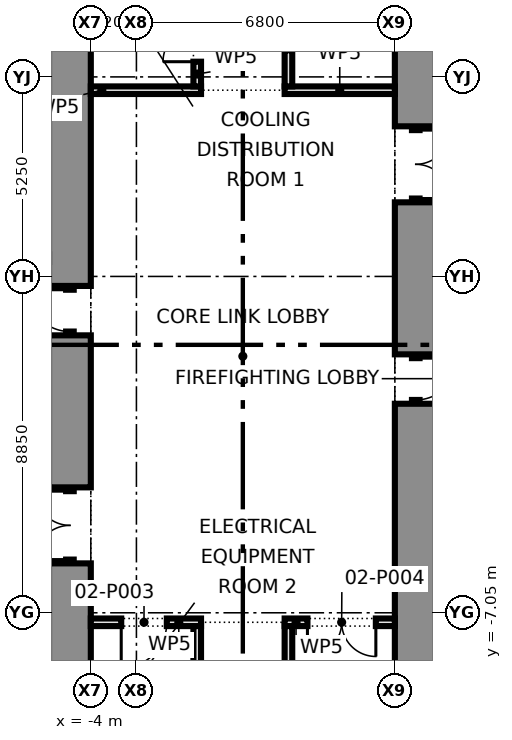
"""IFC4 building model, lengths in metres.
Left out: names, types, materials, properties, quantities, classifications, styles, units other than length and angle.
Written with IfcOpenShell. Run it as: python <this file> out.ifc"""

import sys

from ifc_helpers import new_model, si_unit, direction, frame, frame_2d, origin, place, context, subcontext, project, spatial, rectangle, extrude, element, fill, save


model = new_model("IFC4")
c1 = context("Model", 3, precision=1e-05, world=origin(), true_north=direction((0.0, 1.0)))
c2 = subcontext(c1, "Body", "Model", "MODEL_VIEW")
j1 = project(units=[si_unit("LENGTHUNIT", "METRE"), si_unit("PLANEANGLEUNIT", "RADIAN")], contexts=[c1])
p1 = place(None, origin())
s1 = spatial("IfcSite", under=j1, at=p1, CompositionType="ELEMENT")
p2 = place(p1, origin())
s2 = spatial("IfcBuilding", under=s1, at=p2, CompositionType="ELEMENT")
p3 = place(p2, frame((0.0, 0.0, 6.5)))
s3 = spatial("IfcBuildingStorey", under=s2, at=p3, CompositionType="ELEMENT", Elevation=6.5)
p4 = place(p3, frame((-4.55, -8.9, 0.0), z_axis=(0.0, 0.0, 1.0), x_axis=(0.0, 1.0, 0.0)))
e1 = element("IfcWall", 1, at=p4, inside=s3, PredefinedType="SHEAR", context=c2, shape_type="SweptSolid", body=[
    extrude(rectangle(XDim=3.15, YDim=1.1, at=frame_2d((1.575, 0.0))), origin(), (0.0, 0.0, 1.0), 4.575),
])
p5 = place(p3, frame((-4.55, -5.75, 0.0), z_axis=(0.0, 0.0, 1.0), x_axis=(0.0, 1.0, 0.0)))
e2 = element("IfcWall", 2, at=p5, inside=s3, PredefinedType="PARTITIONING", context=c2, shape_type="SweptSolid", body=[
    extrude(rectangle(XDim=2.0, YDim=0.2, at=frame_2d((1.0, 0.0))), origin(), (0.0, 0.0, 1.0), 2.4),
])
p6 = place(p5, frame((0.1, 0.0, 0.0)))
e3 = element("IfcOpeningElement", 3, at=p6, cuts=e2, PredefinedType="OPENING", context=c2, shape_type="SweptSolid", body=[
    extrude(rectangle(XDim=1.8, YDim=2.1, at=frame_2d((0.9, 1.05))), frame((0.0, 0.11, 0.0), z_axis=(0.0, -1.0, 0.0), x_axis=(1.0, 0.0, 0.0)), (0.0, 0.0, 1.0), 0.22),
])
p7 = place(p3, frame((-4.55, -3.75, 0.0), z_axis=(0.0, 0.0, 1.0), x_axis=(0.0, 1.0, 0.0)))
e4 = element("IfcWall", 4, at=p7, inside=s3, PredefinedType="SHEAR", context=c2, shape_type="SweptSolid", body=[
    extrude(rectangle(XDim=4.0, YDim=1.1, at=frame_2d((2.0, 0.0))), origin(), (0.0, 0.0, 1.0), 4.575),
])
p8 = place(p3, frame((-4.55, 0.25, 0.0), z_axis=(0.0, 0.0, 1.0), x_axis=(0.0, 1.0, 0.0)))
e5 = element("IfcWall", 5, at=p8, inside=s3, PredefinedType="PARTITIONING", context=c2, shape_type="SweptSolid", body=[
    extrude(rectangle(XDim=1.3, YDim=0.2, at=frame_2d((0.65, 0.0))), origin(), (0.0, 0.0, 1.0), 2.4),
])
p9 = place(p8, frame((0.1, 0.0, 0.0)))
e6 = element("IfcOpeningElement", 6, at=p9, cuts=e5, PredefinedType="OPENING", context=c2, shape_type="SweptSolid", body=[
    extrude(rectangle(XDim=1.1, YDim=2.1, at=frame_2d((0.55, 1.05))), frame((0.0, 0.11, 0.0), z_axis=(0.0, -1.0, 0.0), x_axis=(1.0, 0.0, 0.0)), (0.0, 0.0, 1.0), 0.22),
])
p10 = place(p3, frame((-4.55, 1.55, 0.0), z_axis=(0.0, 0.0, 1.0), x_axis=(0.0, 1.0, 0.0)))
e7 = element("IfcWall", 7, at=p10, inside=s3, PredefinedType="SHEAR", context=c2, shape_type="SweptSolid", body=[
    extrude(rectangle(XDim=7.35, YDim=1.1, at=frame_2d((3.675, 0.0))), origin(), (0.0, 0.0, 1.0), 4.575),
])
p11 = place(p3, frame((4.55, 8.9, 0.0), z_axis=(0.0, 0.0, 1.0), x_axis=(0.0, -1.0, 0.0)))
e8 = element("IfcWall", 8, at=p11, inside=s3, PredefinedType="SHEAR", context=c2, shape_type="SweptSolid", body=[
    extrude(rectangle(XDim=3.15, YDim=1.1, at=frame_2d((1.575, 0.0))), origin(), (0.0, 0.0, 1.0), 4.575),
])
p12 = place(p3, frame((4.55, 5.75, 0.0), z_axis=(0.0, 0.0, 1.0), x_axis=(0.0, -1.0, 0.0)))
e9 = element("IfcWall", 9, at=p12, inside=s3, PredefinedType="PARTITIONING", context=c2, shape_type="SweptSolid", body=[
    extrude(rectangle(XDim=2.0, YDim=0.2, at=frame_2d((1.0, 0.0))), origin(), (0.0, 0.0, 1.0), 2.4),
])
p13 = place(p12, frame((0.1, 0.0, 0.0)))
e10 = element("IfcOpeningElement", 10, at=p13, cuts=e9, PredefinedType="OPENING", context=c2, shape_type="SweptSolid", body=[
    extrude(rectangle(XDim=1.8, YDim=2.1, at=frame_2d((0.9, 1.05))), frame((0.0, 0.11, 0.0), z_axis=(0.0, -1.0, 0.0), x_axis=(1.0, 0.0, 0.0)), (0.0, 0.0, 1.0), 0.22),
])
p14 = place(p3, frame((4.55, 3.75, 0.0), z_axis=(0.0, 0.0, 1.0), x_axis=(0.0, -1.0, 0.0)))
e11 = element("IfcWall", 11, at=p14, inside=s3, PredefinedType="SHEAR", context=c2, shape_type="SweptSolid", body=[
    extrude(rectangle(XDim=4.0, YDim=1.1, at=frame_2d((2.0, 0.0))), origin(), (0.0, 0.0, 1.0), 4.575),
])
p15 = place(p3, frame((4.55, -0.25, 0.0), z_axis=(0.0, 0.0, 1.0), x_axis=(0.0, -1.0, 0.0)))
e12 = element("IfcWall", 12, at=p15, inside=s3, PredefinedType="PARTITIONING", context=c2, shape_type="SweptSolid", body=[
    extrude(rectangle(XDim=1.3, YDim=0.2, at=frame_2d((0.65, 0.0))), origin(), (0.0, 0.0, 1.0), 2.4),
])
p16 = place(p15, frame((0.1, 0.0, 0.0)))
e13 = element("IfcOpeningElement", 13, at=p16, cuts=e12, PredefinedType="OPENING", context=c2, shape_type="SweptSolid", body=[
    extrude(rectangle(XDim=1.1, YDim=2.1, at=frame_2d((0.55, 1.05))), frame((0.0, 0.11, 0.0), z_axis=(0.0, -1.0, 0.0), x_axis=(1.0, 0.0, 0.0)), (0.0, 0.0, 1.0), 0.22),
])
p17 = place(p3, frame((4.55, -1.55, 0.0), z_axis=(0.0, 0.0, 1.0), x_axis=(0.0, -1.0, 0.0)))
e14 = element("IfcWall", 14, at=p17, inside=s3, PredefinedType="SHEAR", context=c2, shape_type="SweptSolid", body=[
    extrude(rectangle(XDim=7.35, YDim=1.1, at=frame_2d((3.675, 0.0))), origin(), (0.0, 0.0, 1.0), 4.575),
])
p18 = place(p3, frame((-4.0, -7.3, 0.0), z_axis=(0.0, 0.0, 1.0), x_axis=(1.0, 0.0, 0.0)))
e15 = element("IfcWall", 15, at=p18, inside=s3, PredefinedType="PARTITIONING", context=c2, shape_type="SweptSolid", body=[
    extrude(rectangle(XDim=2.9, YDim=0.2, at=frame_2d((1.45, 0.0))), origin(), (0.0, 0.0, 1.0), 4.575),
])
p19 = place(p18, frame((0.8, 0.0, 0.0)))
e16 = element("IfcOpeningElement", 16, at=p19, cuts=e15, PredefinedType="OPENING", context=c2, shape_type="SweptSolid", body=[
    extrude(rectangle(XDim=1.2, YDim=2.1, at=frame_2d((0.6, 1.05))), frame((0.0, 0.11, 0.0), z_axis=(0.0, -1.0, 0.0), x_axis=(1.0, 0.0, 0.0)), (0.0, 0.0, 1.0), 0.22),
])
p20 = place(p3, frame((1.1, -7.3, 0.0), z_axis=(0.0, 0.0, 1.0), x_axis=(1.0, 0.0, 0.0)))
e17 = element("IfcWall", 17, at=p20, inside=s3, PredefinedType="PARTITIONING", context=c2, shape_type="SweptSolid", body=[
    extrude(rectangle(XDim=2.9, YDim=0.2, at=frame_2d((1.45, 0.0))), origin(), (0.0, 0.0, 1.0), 4.575),
])
p21 = place(p20, frame((0.6, 0.0, 0.0)))
e18 = element("IfcOpeningElement", 18, at=p21, cuts=e17, PredefinedType="OPENING", context=c2, shape_type="SweptSolid", body=[
    extrude(rectangle(XDim=1.8, YDim=2.1, at=frame_2d((0.9, 1.05))), frame((0.0, 0.11, 0.0), z_axis=(0.0, -1.0, 0.0), x_axis=(1.0, 0.0, 0.0)), (0.0, 0.0, 1.0), 0.22),
])
for number, where, z_axis, x_axis in (
    (19, (-4.0, 6.7, 0.0), (0.0, 0.0, 1.0), (1.0, 0.0, 0.0)),
    (20, (1.1, 6.7, 0.0), (0.0, 0.0, 1.0), (1.0, 0.0, 0.0)),
):
    element("IfcWall", number, at=place(p3, frame(where, z_axis=z_axis, x_axis=x_axis)), inside=s3, PredefinedType="PARTITIONING", context=c2, shape_type="SweptSolid", body=[
        extrude(rectangle(XDim=2.9, YDim=0.2, at=frame_2d((1.45, 0.0))), origin(), (0.0, 0.0, 1.0), 4.575),
    ])
p22 = place(p3, frame((1.2, -9.9, 0.0), z_axis=(0.0, 0.0, 1.0), x_axis=(0.0, 1.0, 0.0)))
e21 = element("IfcWall", 21, at=p22, inside=s3, PredefinedType="PARTITIONING", context=c2, shape_type="SweptSolid", body=[
    extrude(rectangle(XDim=2.5, YDim=0.2, at=frame_2d((1.25, 0.0))), origin(), (0.0, 0.0, 1.0), 4.575),
])
p23 = place(p3, frame((1.2, 6.8, 0.0), z_axis=(0.0, 0.0, 1.0), x_axis=(0.0, 1.0, 0.0)))
e22 = element("IfcWall", 22, at=p23, inside=s3, PredefinedType="PARTITIONING", context=c2, shape_type="SweptSolid", body=[
    extrude(rectangle(XDim=3.1, YDim=0.2, at=frame_2d((1.55, 0.0))), origin(), (0.0, 0.0, 1.0), 4.575),
])
p24 = place(p23, frame((0.95, 0.0, 0.0)))
e23 = element("IfcOpeningElement", 23, at=p24, cuts=e22, PredefinedType="OPENING", context=c2, shape_type="SweptSolid", body=[
    extrude(rectangle(XDim=1.2, YDim=2.1, at=frame_2d((0.6, 1.05))), frame((0.0, 0.11, 0.0), z_axis=(0.0, -1.0, 0.0), x_axis=(1.0, 0.0, 0.0)), (0.0, 0.0, 1.0), 0.22),
])
p25 = place(p3, frame((-1.2, -9.9, 0.0), z_axis=(0.0, 0.0, 1.0), x_axis=(0.0, 1.0, 0.0)))
e24 = element("IfcWall", 24, at=p25, inside=s3, PredefinedType="PARTITIONING", context=c2, shape_type="SweptSolid", body=[
    extrude(rectangle(XDim=2.5, YDim=0.2, at=frame_2d((1.25, 0.0))), origin(), (0.0, 0.0, 1.0), 4.575),
])
p26 = place(p3, frame((-1.2, 6.8, 0.0), z_axis=(0.0, 0.0, 1.0), x_axis=(0.0, 1.0, 0.0)))
e25 = element("IfcWall", 25, at=p26, inside=s3, PredefinedType="PARTITIONING", context=c2, shape_type="SweptSolid", body=[
    extrude(rectangle(XDim=3.1, YDim=0.2, at=frame_2d((1.55, 0.0))), origin(), (0.0, 0.0, 1.0), 4.575),
])
p27 = place(p26, frame((0.65, 0.0, 0.0)))
e26 = element("IfcOpeningElement", 26, at=p27, cuts=e25, PredefinedType="OPENING", context=c2, shape_type="SweptSolid", body=[
    extrude(rectangle(XDim=1.8, YDim=2.1, at=frame_2d((0.9, 1.05))), frame((0.0, 0.11, 0.0), z_axis=(0.0, -1.0, 0.0), x_axis=(1.0, 0.0, 0.0)), (0.0, 0.0, 1.0), 0.22),
])
p28 = place(p6, origin())
e27 = element("IfcDoor", 27, at=p28, inside=s3, OperationType="DOUBLE_DOOR_SINGLE_SWING", PredefinedType="DOOR", context=c2, shape_type="SweptSolid", body=[
    extrude(rectangle(XDim=1.8, YDim=2.1, at=frame_2d((0.9, 1.05))), frame((0.0, 0.025, 0.0), z_axis=(0.0, -1.0, 0.0), x_axis=(1.0, 0.0, 0.0)), (0.0, 0.0, 1.0), 0.05),
])
fill(e3, e27)
p29 = place(p9, origin())
e28 = element("IfcDoor", 28, at=p29, inside=s3, OperationType="SINGLE_SWING_RIGHT", PredefinedType="DOOR", context=c2, shape_type="SweptSolid", body=[
    extrude(rectangle(XDim=1.1, YDim=2.1, at=frame_2d((0.55, 1.05))), frame((0.0, 0.025, 0.0), z_axis=(0.0, -1.0, 0.0), x_axis=(1.0, 0.0, 0.0)), (0.0, 0.0, 1.0), 0.05),
])
fill(e6, e28)
p30 = place(p13, origin())
e29 = element("IfcDoor", 29, at=p30, inside=s3, OperationType="DOUBLE_DOOR_SINGLE_SWING", PredefinedType="DOOR", context=c2, shape_type="SweptSolid", body=[
    extrude(rectangle(XDim=1.8, YDim=2.1, at=frame_2d((0.9, 1.05))), frame((0.0, 0.025, 0.0), z_axis=(0.0, -1.0, 0.0), x_axis=(1.0, 0.0, 0.0)), (0.0, 0.0, 1.0), 0.05),
])
fill(e10, e29)
p31 = place(p16, origin())
e30 = element("IfcDoor", 30, at=p31, inside=s3, OperationType="SINGLE_SWING_LEFT", PredefinedType="DOOR", context=c2, shape_type="SweptSolid", body=[
    extrude(rectangle(XDim=1.1, YDim=2.1, at=frame_2d((0.55, 1.05))), frame((0.0, 0.025, 0.0), z_axis=(0.0, -1.0, 0.0), x_axis=(1.0, 0.0, 0.0)), (0.0, 0.0, 1.0), 0.05),
])
fill(e13, e30)
p32 = place(p27, origin())
e31 = element("IfcDoor", 31, at=p32, inside=s3, OperationType="DOUBLE_DOOR_SINGLE_SWING", PredefinedType="DOOR", context=c2, shape_type="SweptSolid", body=[
    extrude(rectangle(XDim=1.8, YDim=2.1, at=frame_2d((0.9, 1.05))), frame((0.0, 0.025, 0.0), z_axis=(0.0, -1.0, 0.0), x_axis=(1.0, 0.0, 0.0)), (0.0, 0.0, 1.0), 0.05),
])
fill(e26, e31)
p33 = place(p19, frame((1.2, 0.0, 0.0), z_axis=(0.0, 0.0, 1.0), x_axis=(-1.0, 0.0, 0.0)))
e32 = element("IfcDoor", 32, at=p33, inside=s3, OperationType="SINGLE_SWING_RIGHT", PredefinedType="DOOR", context=c2, shape_type="SweptSolid", body=[
    extrude(rectangle(XDim=1.2, YDim=2.1, at=frame_2d((0.6, 1.05))), frame((0.0, 0.025, 0.0), z_axis=(0.0, -1.0, 0.0), x_axis=(1.0, 0.0, 0.0)), (0.0, 0.0, 1.0), 0.05),
])
fill(e16, e32)
p34 = place(p21, frame((1.8, 0.0, 0.0), z_axis=(0.0, 0.0, 1.0), x_axis=(-1.0, 0.0, 0.0)))
e33 = element("IfcDoor", 33, at=p34, inside=s3, OperationType="DOUBLE_DOOR_SINGLE_SWING", PredefinedType="DOOR", context=c2, shape_type="SweptSolid", body=[
    extrude(rectangle(XDim=1.8, YDim=2.1, at=frame_2d((0.9, 1.05))), frame((0.0, 0.025, 0.0), z_axis=(0.0, -1.0, 0.0), x_axis=(1.0, 0.0, 0.0)), (0.0, 0.0, 1.0), 0.05),
])
fill(e18, e33)
save(model, sys.argv[1])
